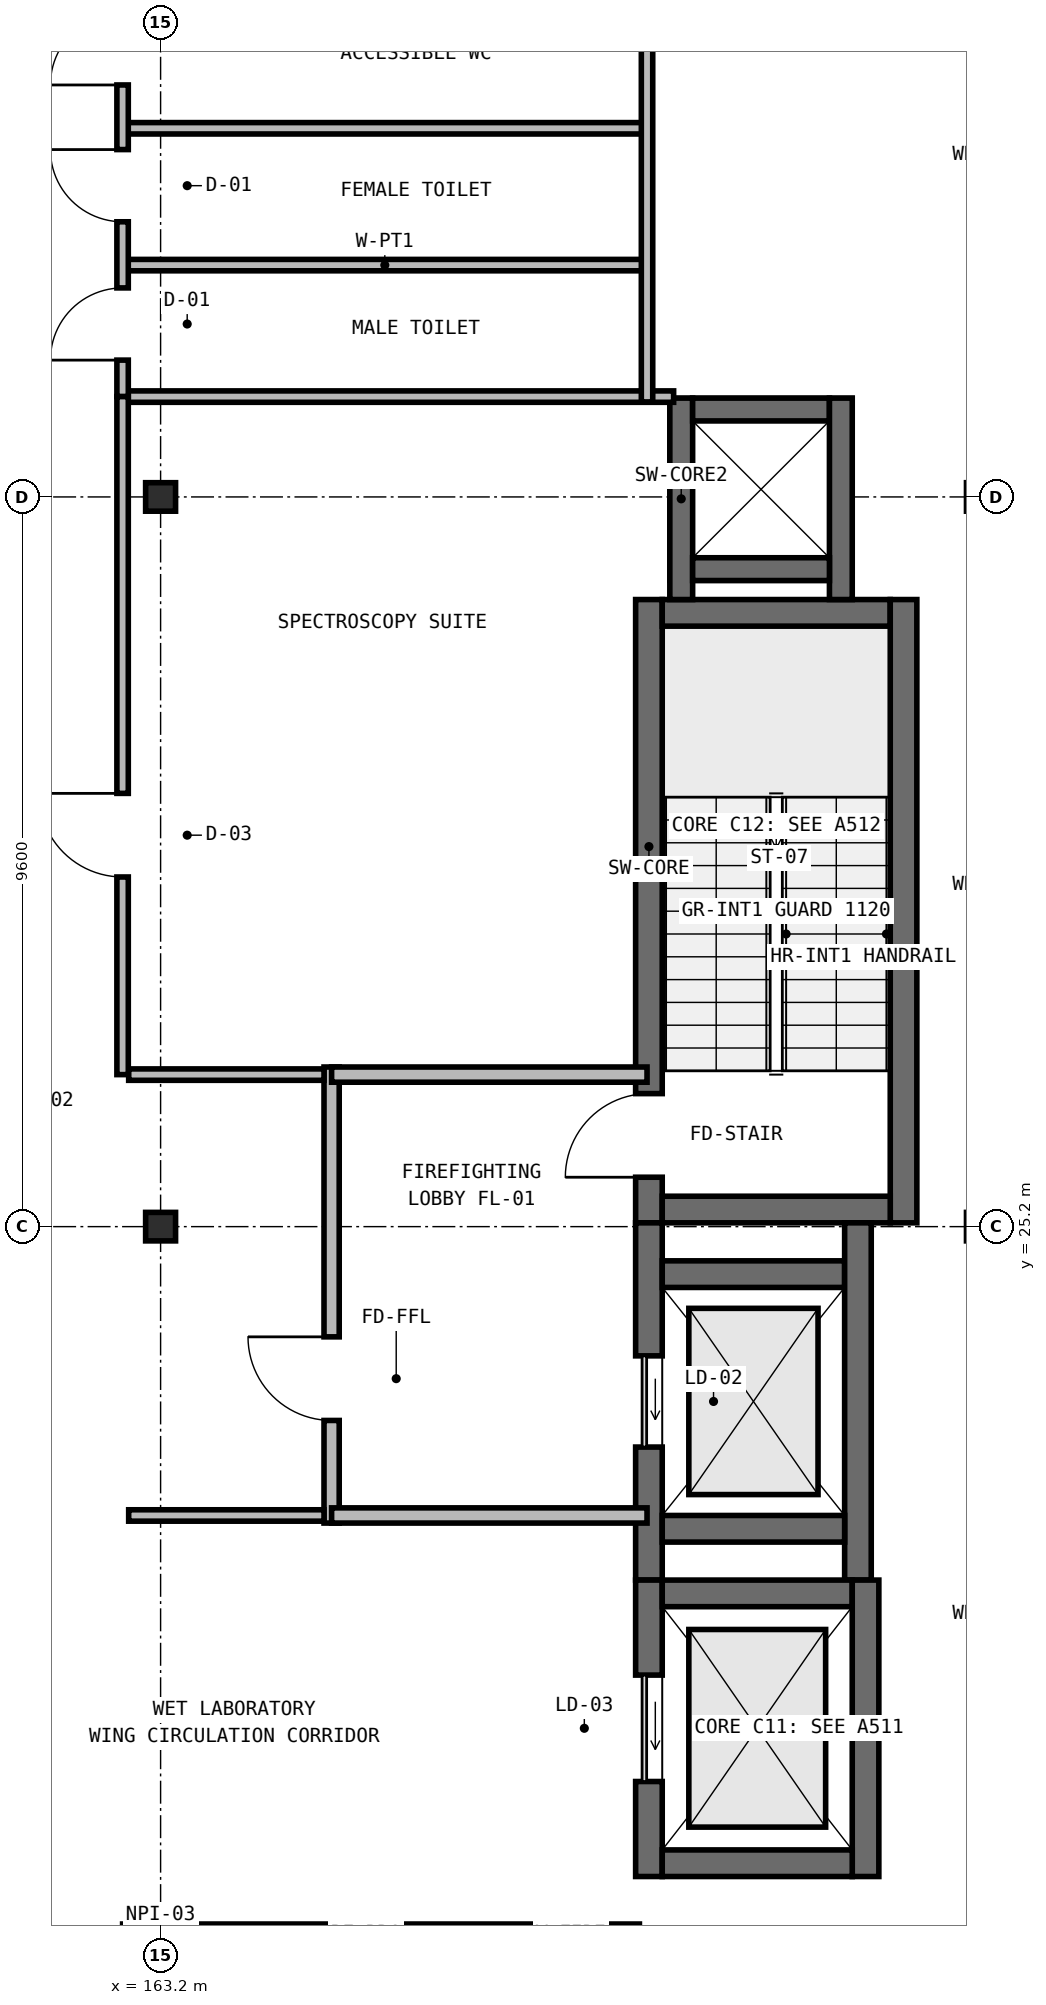
"""IFC4 building model, lengths in metres.
Left out: names, types, materials, properties, quantities, classifications, styles, units other than length and angle.
Written with IfcOpenShell. Run it as: python <this file> out.ifc"""

import sys

from ifc_helpers import new_model, si_unit, direction, frame, frame_2d, origin, origin_2d, place, context, subcontext, project, spatial, rectangle, i_section, extrude, element, fill, save


model = new_model("IFC4")
c1 = context("Model", 3, precision=1e-05, world=origin(), true_north=direction((0.0, 1.0)))
c2 = subcontext(c1, "Body", "Model", "MODEL_VIEW")
j1 = project(units=[si_unit("LENGTHUNIT", "METRE"), si_unit("PLANEANGLEUNIT", "RADIAN")], contexts=[c1])
p1 = place(None, origin())
s1 = spatial("IfcSite", under=j1, at=p1, CompositionType="ELEMENT")
p2 = place(p1, origin())
s2 = spatial("IfcBuilding", under=s1, at=p2, CompositionType="ELEMENT")
p3 = place(p2, frame((0.0, 0.0, 9.8)))
s3 = spatial("IfcBuildingStorey", under=s2, at=p3, CompositionType="ELEMENT", Elevation=9.8)
p4 = place(p3, frame((169.625, 25.25, 0.0), z_axis=(0.0, 0.0, 1.0), x_axis=(0.0, 1.0, 0.0)))
e1 = element("IfcWall", 1, at=p4, inside=s3, PredefinedType="SHEAR", context=c2, shape_type="SweptSolid", body=[
    extrude(rectangle(XDim=8.2, YDim=0.35, at=frame_2d((4.1, 0.0))), origin(), (0.0, 0.0, 1.0), 4.55),
])
p5 = place(p4, frame((0.6, 0.0, 0.0)))
e2 = element("IfcOpeningElement", 2, at=p5, cuts=e1, PredefinedType="OPENING", context=c2, shape_type="SweptSolid", body=[
    extrude(rectangle(XDim=1.1, YDim=2.15, at=frame_2d((0.55, 1.075))), frame((0.0, 0.185, 0.0), z_axis=(0.0, -1.0, 0.0), x_axis=(1.0, 0.0, 0.0)), (0.0, 0.0, 1.0), 0.37),
])
p6 = place(p3, frame((169.8, 33.275, 0.0), z_axis=(0.0, 0.0, 1.0), x_axis=(1.0, 0.0, 0.0)))
e3 = element("IfcWall", 3, at=p6, inside=s3, PredefinedType="SHEAR", context=c2, shape_type="SweptSolid", body=[
    extrude(rectangle(XDim=3.0, YDim=0.35, at=frame_2d((1.5, 0.0))), origin(), (0.0, 0.0, 1.0), 4.55),
])
p7 = place(p3, frame((172.975, 33.45, 0.0), z_axis=(0.0, 0.0, 1.0), x_axis=(0.0, -1.0, 0.0)))
e4 = element("IfcWall", 4, at=p7, inside=s3, PredefinedType="SHEAR", context=c2, shape_type="SweptSolid", body=[
    extrude(rectangle(XDim=8.2, YDim=0.35, at=frame_2d((4.1, 0.0))), origin(), (0.0, 0.0, 1.0), 4.55),
])
p8 = place(p3, frame((172.8, 25.425, 0.0), z_axis=(0.0, 0.0, 1.0), x_axis=(-1.0, 0.0, 0.0)))
e5 = element("IfcWall", 5, at=p8, inside=s3, PredefinedType="SHEAR", context=c2, shape_type="SweptSolid", body=[
    extrude(rectangle(XDim=3.0, YDim=0.35, at=frame_2d((1.5, 0.0))), origin(), (0.0, 0.0, 1.0), 4.55),
])
p9 = place(p3, frame((169.625, 20.55, 0.0), z_axis=(0.0, 0.0, 1.0), x_axis=(0.0, 1.0, 0.0)))
e6 = element("IfcWall", 6, at=p9, inside=s3, PredefinedType="SHEAR", context=c2, shape_type="SweptSolid", body=[
    extrude(rectangle(XDim=4.7, YDim=0.35, at=frame_2d((2.35, 0.0))), origin(), (0.0, 0.0, 1.0), 4.55),
])
p10 = place(p9, frame((1.75, 0.0, 0.0)))
e7 = element("IfcOpeningElement", 7, at=p10, cuts=e6, PredefinedType="OPENING", context=c2, shape_type="SweptSolid", body=[
    extrude(rectangle(XDim=1.2, YDim=2.15, at=frame_2d((0.6, 1.075))), frame((0.0, 0.185, 0.0), z_axis=(0.0, -1.0, 0.0), x_axis=(1.0, 0.0, 0.0)), (0.0, 0.0, 1.0), 0.37),
])
p11 = place(p3, frame((169.8, 24.575, 0.0), z_axis=(0.0, 0.0, 1.0), x_axis=(1.0, 0.0, 0.0)))
e8 = element("IfcWall", 8, at=p11, inside=s3, PredefinedType="SHEAR", context=c2, shape_type="SweptSolid", body=[
    extrude(rectangle(XDim=2.4, YDim=0.35, at=frame_2d((1.2, 0.0))), origin(), (0.0, 0.0, 1.0), 4.55),
])
p12 = place(p3, frame((172.375, 25.25, 0.0), z_axis=(0.0, 0.0, 1.0), x_axis=(0.0, -1.0, 0.0)))
e9 = element("IfcWall", 9, at=p12, inside=s3, PredefinedType="SHEAR", context=c2, shape_type="SweptSolid", body=[
    extrude(rectangle(XDim=4.7, YDim=0.35, at=frame_2d((2.35, 0.0))), origin(), (0.0, 0.0, 1.0), 4.55),
])
p13 = place(p3, frame((172.2, 21.225, 0.0), z_axis=(0.0, 0.0, 1.0), x_axis=(-1.0, 0.0, 0.0)))
e10 = element("IfcWall", 10, at=p13, inside=s3, PredefinedType="SHEAR", context=c2, shape_type="SweptSolid", body=[
    extrude(rectangle(XDim=2.4, YDim=0.35, at=frame_2d((1.2, 0.0))), origin(), (0.0, 0.0, 1.0), 4.55),
])
p14 = place(p3, frame((169.625, 16.65, 0.0), z_axis=(0.0, 0.0, 1.0), x_axis=(0.0, 1.0, 0.0)))
e11 = element("IfcWall", 11, at=p14, inside=s3, PredefinedType="SHEAR", context=c2, shape_type="SweptSolid", body=[
    extrude(rectangle(XDim=3.9, YDim=0.35, at=frame_2d((1.95, 0.0))), origin(), (0.0, 0.0, 1.0), 4.55),
])
p15 = place(p14, frame((1.25, 0.0, 0.0)))
e12 = element("IfcOpeningElement", 12, at=p15, cuts=e11, PredefinedType="OPENING", context=c2, shape_type="SweptSolid", body=[
    extrude(rectangle(XDim=1.4, YDim=2.3, at=frame_2d((0.7, 1.15))), frame((0.0, 0.185, 0.0), z_axis=(0.0, -1.0, 0.0), x_axis=(1.0, 0.0, 0.0)), (0.0, 0.0, 1.0), 0.37),
])
p16 = place(p3, frame((169.8, 20.375, 0.0), z_axis=(0.0, 0.0, 1.0), x_axis=(1.0, 0.0, 0.0)))
e13 = element("IfcWall", 13, at=p16, inside=s3, PredefinedType="SHEAR", context=c2, shape_type="SweptSolid", body=[
    extrude(rectangle(XDim=2.5, YDim=0.35, at=frame_2d((1.25, 0.0))), origin(), (0.0, 0.0, 1.0), 4.55),
])
p17 = place(p3, frame((172.475, 20.55, 0.0), z_axis=(0.0, 0.0, 1.0), x_axis=(0.0, -1.0, 0.0)))
e14 = element("IfcWall", 14, at=p17, inside=s3, PredefinedType="SHEAR", context=c2, shape_type="SweptSolid", body=[
    extrude(rectangle(XDim=3.9, YDim=0.35, at=frame_2d((1.95, 0.0))), origin(), (0.0, 0.0, 1.0), 4.55),
])
p18 = place(p3, frame((172.3, 16.825, 0.0), z_axis=(0.0, 0.0, 1.0), x_axis=(-1.0, 0.0, 0.0)))
e15 = element("IfcWall", 15, at=p18, inside=s3, PredefinedType="SHEAR", context=c2, shape_type="SweptSolid", body=[
    extrude(rectangle(XDim=2.5, YDim=0.35, at=frame_2d((1.25, 0.0))), origin(), (0.0, 0.0, 1.0), 4.55),
])
for number, where, z_axis, x_axis in (
    (16, (163.2, 25.2, 0.0), (0.0, 0.0, 1.0), (1.0, 0.0, 0.0)),
    (17, (163.2, 34.8, 0.0), (0.0, 0.0, 1.0), (1.0, 0.0, 0.0)),
):
    element("IfcColumn", number, at=place(p3, frame(where, z_axis=z_axis, x_axis=x_axis)), inside=s3, PredefinedType="COLUMN", context=c2, shape_type="SweptSolid", body=[
        extrude(i_section(OverallWidth=0.394, OverallDepth=0.375, WebThickness=0.02, FlangeThickness=0.032, at=origin_2d()), origin(), (0.0, 0.0, 1.0), 4.55),
    ])
p19 = place(p3, frame((170.05, 33.45, 0.0), z_axis=(0.0, 0.0, 1.0), x_axis=(0.0, 1.0, 0.0)))
e18 = element("IfcWall", 18, at=p19, inside=s3, PredefinedType="SHEAR", context=c2, shape_type="SweptSolid", body=[
    extrude(rectangle(XDim=2.65, YDim=0.3, at=frame_2d((1.325, 0.0))), origin(), (0.0, 0.0, 1.0), 4.37),
])
p20 = place(p3, frame((170.2, 35.95, 0.0), z_axis=(0.0, 0.0, 1.0), x_axis=(1.0, 0.0, 0.0)))
e19 = element("IfcWall", 19, at=p20, inside=s3, PredefinedType="SHEAR", context=c2, shape_type="SweptSolid", body=[
    extrude(rectangle(XDim=1.8, YDim=0.3, at=frame_2d((0.9, 0.0))), origin(), (0.0, 0.0, 1.0), 4.37),
])
p21 = place(p3, frame((172.15, 36.1, 0.0), z_axis=(0.0, 0.0, 1.0), x_axis=(0.0, -1.0, 0.0)))
e20 = element("IfcWall", 20, at=p21, inside=s3, PredefinedType="SHEAR", context=c2, shape_type="SweptSolid", body=[
    extrude(rectangle(XDim=2.65, YDim=0.3, at=frame_2d((1.325, 0.0))), origin(), (0.0, 0.0, 1.0), 4.37),
])
p22 = place(p3, frame((172.0, 33.85, 0.0), z_axis=(0.0, 0.0, 1.0), x_axis=(-1.0, 0.0, 0.0)))
e21 = element("IfcWall", 21, at=p22, inside=s3, PredefinedType="SHEAR", context=c2, shape_type="SweptSolid", body=[
    extrude(rectangle(XDim=1.8, YDim=0.3, at=frame_2d((0.9, 0.0))), origin(), (0.0, 0.0, 1.0), 4.37),
])
p23 = place(p3, frame((165.45, 21.3, 0.0), z_axis=(0.0, 0.0, 1.0), x_axis=(0.0, 1.0, 0.0)))
e22 = element("IfcWall", 22, at=p23, inside=s3, PredefinedType="SOLIDWALL", context=c2, shape_type="SweptSolid", body=[
    extrude(rectangle(XDim=6.0, YDim=0.2, at=frame_2d((3.0, 0.0))), origin(), (0.0, 0.0, 1.0), 4.3),
])
p24 = place(p23, frame((1.35, 0.0, 0.0)))
e23 = element("IfcOpeningElement", 23, at=p24, cuts=e22, PredefinedType="OPENING", context=c2, shape_type="SweptSolid", body=[
    extrude(rectangle(XDim=1.1, YDim=2.15, at=frame_2d((0.55, 1.075))), frame((0.0, 0.11, 0.0), z_axis=(0.0, -1.0, 0.0), x_axis=(1.0, 0.0, 0.0)), (0.0, 0.0, 1.0), 0.22),
])
for number, where, z_axis, x_axis in (
    (24, (165.45, 21.4, 0.0), (0.0, 0.0, 1.0), (1.0, 0.0, 0.0)),
    (25, (165.45, 27.2, 0.0), (0.0, 0.0, 1.0), (1.0, 0.0, 0.0)),
):
    element("IfcWall", number, at=place(p3, frame(where, z_axis=z_axis, x_axis=x_axis)), inside=s3, PredefinedType="SOLIDWALL", context=c2, shape_type="SweptSolid", body=[
        extrude(rectangle(XDim=4.15, YDim=0.2, at=frame_2d((2.075, 0.0))), origin(), (0.0, 0.0, 1.0), 4.3),
    ])
for number, where, z_axis, x_axis in (
    (26, (162.7, 37.85, 0.0), (0.0, 0.0, 1.0), (1.0, 0.0, 0.0)),
    (27, (162.7, 39.65, 0.0), (0.0, 0.0, 1.0), (1.0, 0.0, 0.0)),
):
    element("IfcWall", number, at=place(p3, frame(where, z_axis=z_axis, x_axis=x_axis)), inside=s3, PredefinedType="PARTITIONING", context=c2, shape_type="SweptSolid", body=[
        extrude(rectangle(XDim=6.9, YDim=0.15, at=frame_2d((3.45, 0.0))), origin(), (0.0, 0.0, 1.0), 4.3),
    ])
p25 = place(p3, frame((162.7, 36.12, 0.0), z_axis=(0.0, 0.0, 1.0), x_axis=(1.0, 0.0, 0.0)))
e28 = element("IfcWall", 28, at=p25, inside=s3, PredefinedType="PARTITIONING", context=c2, shape_type="SweptSolid", body=[
    extrude(rectangle(XDim=7.25, YDim=0.15, at=frame_2d((3.625, 0.0))), origin(), (0.0, 0.0, 1.0), 4.3),
])
p26 = place(p3, frame((169.6, 36.05, 0.0), z_axis=(0.0, 0.0, 1.0), x_axis=(0.0, 1.0, 0.0)))
e29 = element("IfcWall", 29, at=p26, inside=s3, PredefinedType="PARTITIONING", context=c2, shape_type="SweptSolid", body=[
    extrude(rectangle(XDim=5.5, YDim=0.15, at=frame_2d((2.75, 0.0))), origin(), (0.0, 0.0, 1.0), 4.3),
])
p27 = place(p3, frame((162.7, 36.12, 0.0), z_axis=(0.0, 0.0, 1.0), x_axis=(0.0, 1.0, 0.0)))
e30 = element("IfcWall", 30, at=p27, inside=s3, PredefinedType="PARTITIONING", context=c2, shape_type="SweptSolid", body=[
    extrude(rectangle(XDim=5.4, YDim=0.15, at=frame_2d((2.7, 0.0))), origin(), (0.0, 0.0, 1.0), 4.3),
])
p28 = place(p27, frame((0.48, 0.0, 0.0)))
e31 = element("IfcOpeningElement", 31, at=p28, cuts=e30, PredefinedType="OPENING", context=c2, shape_type="SweptSolid", body=[
    extrude(rectangle(XDim=0.95, YDim=2.1, at=frame_2d((0.475, 1.05))), frame((0.0, 0.085, 0.0), z_axis=(0.0, -1.0, 0.0), x_axis=(1.0, 0.0, 0.0)), (0.0, 0.0, 1.0), 0.17),
])
p29 = place(p27, frame((2.3, 0.0, 0.0)))
e32 = element("IfcOpeningElement", 32, at=p29, cuts=e30, PredefinedType="OPENING", context=c2, shape_type="SweptSolid", body=[
    extrude(rectangle(XDim=0.95, YDim=2.1, at=frame_2d((0.475, 1.05))), frame((0.0, 0.085, 0.0), z_axis=(0.0, -1.0, 0.0), x_axis=(1.0, 0.0, 0.0)), (0.0, 0.0, 1.0), 0.17),
])
p30 = place(p27, frame((4.1, 0.0, 0.0)))
e33 = element("IfcOpeningElement", 33, at=p30, cuts=e30, PredefinedType="OPENING", context=c2, shape_type="SweptSolid", body=[
    extrude(rectangle(XDim=0.95, YDim=2.1, at=frame_2d((0.475, 1.05))), frame((0.0, 0.085, 0.0), z_axis=(0.0, -1.0, 0.0), x_axis=(1.0, 0.0, 0.0)), (0.0, 0.0, 1.0), 0.17),
])
p31 = place(p3, frame((162.78, 27.2, 0.0), z_axis=(0.0, 0.0, 1.0), x_axis=(1.0, 0.0, 0.0)))
e34 = element("IfcWall", 34, at=p31, inside=s3, PredefinedType="PARTITIONING", context=c2, shape_type="SweptSolid", body=[
    extrude(rectangle(XDim=2.57, YDim=0.15, at=frame_2d((1.285, 0.0))), origin(), (0.0, 0.0, 1.0), 4.3),
])
p32 = place(p3, frame((162.7, 27.2, 0.0), z_axis=(0.0, 0.0, 1.0), x_axis=(0.0, 1.0, 0.0)))
e35 = element("IfcWall", 35, at=p32, inside=s3, PredefinedType="PARTITIONING", context=c2, shape_type="SweptSolid", body=[
    extrude(rectangle(XDim=8.92, YDim=0.15, at=frame_2d((4.46, 0.0))), origin(), (0.0, 0.0, 1.0), 4.3),
])
p33 = place(p32, frame((2.6, 0.0, 0.0)))
e36 = element("IfcOpeningElement", 36, at=p33, cuts=e35, PredefinedType="OPENING", context=c2, shape_type="SweptSolid", body=[
    extrude(rectangle(XDim=1.1, YDim=2.2, at=frame_2d((0.55, 1.1))), frame((0.0, 0.085, 0.0), z_axis=(0.0, -1.0, 0.0), x_axis=(1.0, 0.0, 0.0)), (0.0, 0.0, 1.0), 0.17),
])
p34 = place(p3, frame((162.78, 21.4, 0.0), z_axis=(0.0, 0.0, 1.0), x_axis=(1.0, 0.0, 0.0)))
e37 = element("IfcWall", 37, at=p34, inside=s3, PredefinedType="PARTITIONING", context=c2, shape_type="SweptSolid", body=[
    extrude(rectangle(XDim=2.57, YDim=0.15, at=frame_2d((1.285, 0.0))), origin(), (0.0, 0.0, 1.0), 4.3),
])
p35 = place(p3, frame((162.7, 15.95, 0.0), z_axis=(0.0, 0.0, 1.0), x_axis=(1.0, 0.0, 0.0)))
e38 = element("IfcWall", 38, at=p35, inside=s3, PredefinedType="PARTITIONING", context=c2, shape_type="SweptSolid", body=[
    extrude(rectangle(XDim=6.8, YDim=0.15, at=frame_2d((3.4, 0.0))), origin(), (0.0, 0.0, 1.0), 4.3),
])
p36 = place(p5, origin())
e39 = element("IfcDoor", 39, at=p36, inside=s3, OperationType="SINGLE_SWING_LEFT", PredefinedType="DOOR", context=c2, shape_type="SweptSolid", body=[
    extrude(rectangle(XDim=1.1, YDim=2.15, at=frame_2d((0.55, 1.075))), frame((0.0, 0.025, 0.0), z_axis=(0.0, -1.0, 0.0), x_axis=(1.0, 0.0, 0.0)), (0.0, 0.0, 1.0), 0.05),
])
fill(e2, e39)
p37 = place(p10, origin())
e40 = element("IfcDoor", 40, at=p37, inside=s3, OperationType="SLIDING_TO_LEFT", PredefinedType="USERDEFINED", context=c2, shape_type="SweptSolid", body=[
    extrude(rectangle(XDim=1.2, YDim=2.15, at=frame_2d((0.6, 1.075))), frame((0.0, 0.025, 0.0), z_axis=(0.0, -1.0, 0.0), x_axis=(1.0, 0.0, 0.0)), (0.0, 0.0, 1.0), 0.05),
])
fill(e7, e40)
p38 = place(p15, origin())
e41 = element("IfcDoor", 41, at=p38, inside=s3, OperationType="SLIDING_TO_LEFT", PredefinedType="USERDEFINED", context=c2, shape_type="SweptSolid", body=[
    extrude(rectangle(XDim=1.4, YDim=2.3, at=frame_2d((0.7, 1.15))), frame((0.0, 0.025, 0.0), z_axis=(0.0, -1.0, 0.0), x_axis=(1.0, 0.0, 0.0)), (0.0, 0.0, 1.0), 0.05),
])
fill(e12, e41)
p39 = place(p24, origin())
e42 = element("IfcDoor", 42, at=p39, inside=s3, OperationType="SINGLE_SWING_RIGHT", PredefinedType="DOOR", context=c2, shape_type="SweptSolid", body=[
    extrude(rectangle(XDim=1.1, YDim=2.15, at=frame_2d((0.55, 1.075))), frame((0.0, 0.025, 0.0), z_axis=(0.0, -1.0, 0.0), x_axis=(1.0, 0.0, 0.0)), (0.0, 0.0, 1.0), 0.05),
])
fill(e23, e42)
p40 = place(p28, origin())
e43 = element("IfcDoor", 43, at=p40, inside=s3, OperationType="SINGLE_SWING_LEFT", PredefinedType="DOOR", context=c2, shape_type="SweptSolid", body=[
    extrude(rectangle(XDim=0.95, YDim=2.1, at=frame_2d((0.475, 1.05))), frame((0.0, 0.025, 0.0), z_axis=(0.0, -1.0, 0.0), x_axis=(1.0, 0.0, 0.0)), (0.0, 0.0, 1.0), 0.05),
])
fill(e31, e43)
p41 = place(p29, origin())
e44 = element("IfcDoor", 44, at=p41, inside=s3, OperationType="SINGLE_SWING_RIGHT", PredefinedType="DOOR", context=c2, shape_type="SweptSolid", body=[
    extrude(rectangle(XDim=0.95, YDim=2.1, at=frame_2d((0.475, 1.05))), frame((0.0, 0.025, 0.0), z_axis=(0.0, -1.0, 0.0), x_axis=(1.0, 0.0, 0.0)), (0.0, 0.0, 1.0), 0.05),
])
fill(e32, e44)
p42 = place(p30, origin())
e45 = element("IfcDoor", 45, at=p42, inside=s3, OperationType="SINGLE_SWING_LEFT", PredefinedType="DOOR", context=c2, shape_type="SweptSolid", body=[
    extrude(rectangle(XDim=0.95, YDim=2.1, at=frame_2d((0.475, 1.05))), frame((0.0, 0.025, 0.0), z_axis=(0.0, -1.0, 0.0), x_axis=(1.0, 0.0, 0.0)), (0.0, 0.0, 1.0), 0.05),
])
fill(e33, e45)
p43 = place(p33, origin())
e46 = element("IfcDoor", 46, at=p43, inside=s3, OperationType="SINGLE_SWING_RIGHT", PredefinedType="DOOR", context=c2, shape_type="SweptSolid", body=[
    extrude(rectangle(XDim=1.1, YDim=2.2, at=frame_2d((0.55, 1.1))), frame((0.0, 0.025, 0.0), z_axis=(0.0, -1.0, 0.0), x_axis=(1.0, 0.0, 0.0)), (0.0, 0.0, 1.0), 0.05),
])
fill(e36, e46)
save(model, sys.argv[1])
